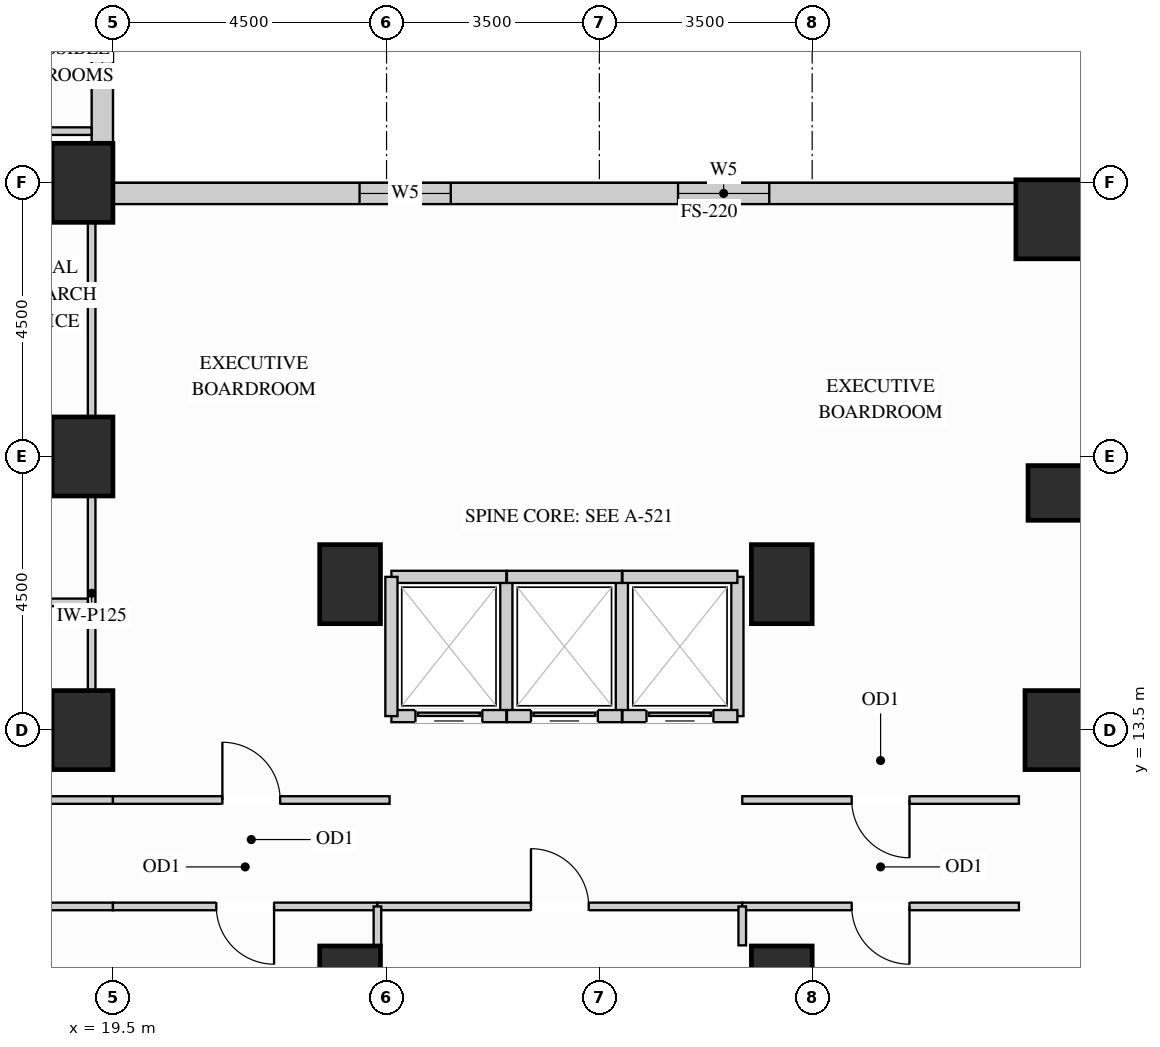
"""IFC4 building model, lengths in metres.
Left out: names, types, materials, properties, quantities, classifications, styles, units other than length and angle.
Written with IfcOpenShell. Run it as: python <this file> out.ifc"""

import sys

from ifc_helpers import new_model, si_unit, direction, frame, frame_2d, origin, origin_2d, place, context, subcontext, project, spatial, rectangle, extrude, source, transform, mapped, element, fill, save


model = new_model("IFC4")
c1 = context("Model", 3, precision=1e-05, world=origin(), true_north=direction((0.0, 1.0)))
c2 = subcontext(c1, "Body", "Model", "MODEL_VIEW")
j1 = project(units=[si_unit("LENGTHUNIT", "METRE"), si_unit("PLANEANGLEUNIT", "RADIAN")], contexts=[c1])
p1 = place(None, origin())
s1 = spatial("IfcSite", under=j1, at=p1, CompositionType="ELEMENT")
p2 = place(p1, origin())
s2 = spatial("IfcBuilding", under=s1, at=p2, CompositionType="ELEMENT")
p3 = place(p2, frame((0.0, 0.0, 69.3)))
s3 = spatial("IfcBuildingStorey", under=s2, at=p3, CompositionType="ELEMENT", Elevation=69.3)
m1 = source(origin(), c2, "Body", "SweptSolid", [
    extrude(rectangle(XDim=0.9, YDim=0.9, at=origin_2d()), origin(), (0.0, 0.0, 1.0), 3.32),
])
p4 = place(p3, frame((35.0, 17.4, 0.0), z_axis=(0.0, 0.0, 1.0), x_axis=(1.0, 0.0, 0.0)))
e1 = element("IfcColumn", 1, at=p4, inside=s3, PredefinedType="COLUMN", context=c2, shape_type="MappedRepresentation", body=[
    mapped(m1, transform((0.0, 0.0, 0.0), x_axis=(1.0, 0.0, 0.0), y_axis=(0.0, 1.0, 0.0), z_axis=(0.0, 0.0, 1.0))),
])
m2 = source(origin(), c2, "Body", "SweptSolid", [
    extrude(rectangle(XDim=1.0, YDim=1.3, at=origin_2d()), origin(), (0.0, 0.0, 1.0), 3.32),
])
for number, where, z_axis, x_axis in (
    (2, (19.0, 13.5, 0.0), (0.0, 0.0, 1.0), (1.0, 0.0, 0.0)),
    (3, (19.0, 18.0, 0.0), (0.0, 0.0, 1.0), (1.0, 0.0, 0.0)),
    (4, (19.0, 22.5, 0.0), (0.0, 0.0, 1.0), (1.0, 0.0, 0.0)),
    (5, (35.0, 13.5, 0.0), (0.0, 0.0, 1.0), (1.0, 0.0, 0.0)),
    (6, (23.4, 15.9, 0.0), (0.0, 0.0, 1.0), (1.0, 0.0, 0.0)),
    (7, (23.4, 9.3, 0.0), (0.0, 0.0, 1.0), (1.0, 0.0, 0.0)),
    (8, (30.5, 15.9, 0.0), (0.0, 0.0, 1.0), (1.0, 0.0, 0.0)),
    (9, (30.5, 9.3, 0.0), (0.0, 0.0, 1.0), (1.0, 0.0, 0.0)),
):
    element("IfcColumn", number, at=place(p3, frame(where, z_axis=z_axis, x_axis=x_axis)), inside=s3, PredefinedType="COLUMN", context=c2, shape_type="MappedRepresentation", body=[
        mapped(m2, transform((0.0, 0.0, 0.0), x_axis=(1.0, 0.0, 0.0), y_axis=(0.0, 1.0, 0.0), z_axis=(0.0, 0.0, 1.0))),
    ])
m3 = source(origin(), c2, "Body", "SweptSolid", [
    extrude(rectangle(XDim=1.3, YDim=1.3, at=origin_2d()), origin(), (0.0, 0.0, 1.0), 3.32),
])
p5 = place(p3, frame((35.0, 21.9, 0.0), z_axis=(0.0, 0.0, 1.0), x_axis=(1.0, 0.0, 0.0)))
e10 = element("IfcColumn", 10, at=p5, inside=s3, PredefinedType="COLUMN", context=c2, shape_type="MappedRepresentation", body=[
    mapped(m3, transform((0.0, 0.0, 0.0), x_axis=(1.0, 0.0, 0.0), y_axis=(0.0, 1.0, 0.0), z_axis=(0.0, 0.0, 1.0))),
])
p6 = place(p3, frame((34.352, 22.325, 0.0), z_axis=(0.0, 0.0, 1.0), x_axis=(-1.0, 0.0, 0.0)))
e11 = element("IfcWall", 11, at=p6, inside=s3, PredefinedType="SOLIDWALL", context=c2, shape_type="SweptSolid", body=[
    extrude(rectangle(XDim=14.854, YDim=0.35, at=frame_2d((7.427, 0.0))), origin(), (0.0, 0.0, 1.0), 3.305),
])
p7 = place(p6, frame((4.058, 0.0, 0.78)))
e12 = element("IfcOpeningElement", 12, at=p7, cuts=e11, PredefinedType="OPENING", context=c2, shape_type="SweptSolid", body=[
    extrude(rectangle(XDim=1.5, YDim=2.0, at=frame_2d((0.75, 1.0))), frame((0.0, 0.185, 0.0), z_axis=(0.0, -1.0, 0.0), x_axis=(1.0, 0.0, 0.0)), (0.0, 0.0, 1.0), 0.37),
])
p8 = place(p6, frame((9.296, 0.0, 0.78)))
e13 = element("IfcOpeningElement", 13, at=p8, cuts=e11, PredefinedType="OPENING", context=c2, shape_type="SweptSolid", body=[
    extrude(rectangle(XDim=1.5, YDim=2.0, at=frame_2d((0.75, 1.0))), frame((0.0, 0.185, 0.0), z_axis=(0.0, -1.0, 0.0), x_axis=(1.0, 0.0, 0.0)), (0.0, 0.0, 1.0), 0.37),
])
p9 = place(p3, frame((19.325, 23.148, 0.0), z_axis=(0.0, 0.0, 1.0), x_axis=(0.0, 1.0, 0.0)))
e14 = element("IfcWall", 14, at=p9, inside=s3, PredefinedType="SOLIDWALL", context=c2, shape_type="SweptSolid", body=[
    extrude(rectangle(XDim=3.004, YDim=0.35, at=frame_2d((1.502, 0.0))), origin(), (0.0, 0.0, 1.0), 2.45),
])
p10 = place(p9, frame((1.031, 0.0, 0.78)))
e15 = element("IfcOpeningElement", 15, at=p10, cuts=e14, PredefinedType="OPENING", context=c2, shape_type="SweptSolid", body=[
    extrude(rectangle(XDim=1.5, YDim=1.49, at=frame_2d((0.75, 0.745))), frame((0.0, 0.185, 0.0), z_axis=(0.0, -1.0, 0.0), x_axis=(1.0, 0.0, 0.0)), (0.0, 0.0, 1.0), 0.37),
])
m4 = source(origin(), c2, "Body", "SweptSolid", [
    extrude(rectangle(XDim=2.6, YDim=0.125, at=frame_2d((1.3, 0.0))), origin(), (0.0, 0.0, 1.0), 3.305),
])
p11 = place(p3, frame((16.55, 15.6, 0.0), z_axis=(0.0, 0.0, 1.0), x_axis=(1.0, 0.0, 0.0)))
e16 = element("IfcWall", 16, at=p11, inside=s3, PredefinedType="PARTITIONING", context=c2, shape_type="MappedRepresentation", body=[
    mapped(m4, transform((0.0, 0.0, 0.0), x_axis=(1.0, 0.0, 0.0), y_axis=(0.0, 1.0, 0.0), z_axis=(0.0, 0.0, 1.0))),
])
m5 = source(origin(), c2, "Body", "SweptSolid", [
    extrude(rectangle(XDim=2.598, YDim=0.125, at=frame_2d((1.299, 0.0))), origin(), (0.0, 0.0, 1.0), 3.305),
])
p12 = place(p3, frame((16.55, 23.35, 0.0), z_axis=(0.0, 0.0, 1.0), x_axis=(1.0, 0.0, 0.0)))
e17 = element("IfcWall", 17, at=p12, inside=s3, PredefinedType="PARTITIONING", context=c2, shape_type="MappedRepresentation", body=[
    mapped(m5, transform((0.0, 0.0, 0.0), x_axis=(1.0, 0.0, 0.0), y_axis=(0.0, 1.0, 0.0), z_axis=(0.0, 0.0, 1.0))),
])
m6 = source(origin(), c2, "Body", "SweptSolid", [
    extrude(rectangle(XDim=3.18, YDim=0.125, at=frame_2d((1.59, 0.0))), origin(), (0.0, 0.0, 1.0), 2.61),
])
for number, where, z_axis, x_axis in (
    (18, (19.15, 14.16, 0.0), (0.0, 0.0, 1.0), (0.0, 1.0, 0.0)),
    (19, (19.15, 18.66, 0.0), (0.0, 0.0, 1.0), (0.0, 1.0, 0.0)),
):
    element("IfcWall", number, at=place(p3, frame(where, z_axis=z_axis, x_axis=x_axis)), inside=s3, PredefinedType="PARTITIONING", context=c2, shape_type="MappedRepresentation", body=[
        mapped(m6, transform((0.0, 0.0, 0.0), x_axis=(1.0, 0.0, 0.0), y_axis=(0.0, 1.0, 0.0), z_axis=(0.0, 0.0, 1.0))),
    ])
p13 = place(p3, frame((29.85, 12.35, 0.0), z_axis=(0.0, 0.0, 1.0), x_axis=(1.0, 0.0, 0.0)))
e20 = element("IfcWall", 20, at=p13, inside=s3, PredefinedType="PARTITIONING", context=c2, shape_type="SweptSolid", body=[
    extrude(rectangle(XDim=4.55, YDim=0.125, at=frame_2d((2.275, 0.0))), origin(), (0.0, 0.0, 1.0), 3.305),
])
p14 = place(p13, frame((1.8, 0.0, 0.0)))
e21 = element("IfcOpeningElement", 21, at=p14, cuts=e20, PredefinedType="OPENING", context=c2, shape_type="SweptSolid", body=[
    extrude(rectangle(XDim=0.95, YDim=2.15, at=frame_2d((0.475, 1.075))), frame((0.0, 0.073, 0.0), z_axis=(0.0, -1.0, 0.0), x_axis=(1.0, 0.0, 0.0)), (0.0, 0.0, 1.0), 0.145),
])
m7 = source(origin(), c2, "Body", "SweptSolid", [
    extrude(rectangle(XDim=2.95, YDim=0.125, at=frame_2d((1.475, 0.0))), origin(), (0.0, 0.0, 1.0), 3.305),
])
p15 = place(p3, frame((16.55, 12.35, 0.0), z_axis=(0.0, 0.0, 1.0), x_axis=(1.0, 0.0, 0.0)))
e22 = element("IfcWall", 22, at=p15, inside=s3, PredefinedType="PARTITIONING", context=c2, shape_type="MappedRepresentation", body=[
    mapped(m7, transform((0.0, 0.0, 0.0), x_axis=(1.0, 0.0, 0.0), y_axis=(0.0, 1.0, 0.0), z_axis=(0.0, 0.0, 1.0))),
])
p16 = place(p3, frame((19.5, 12.35, 0.0), z_axis=(0.0, 0.0, 1.0), x_axis=(1.0, 0.0, 0.0)))
e23 = element("IfcWall", 23, at=p16, inside=s3, PredefinedType="PARTITIONING", context=c2, shape_type="SweptSolid", body=[
    extrude(rectangle(XDim=4.55, YDim=0.125, at=frame_2d((2.275, 0.0))), origin(), (0.0, 0.0, 1.0), 3.305),
])
p17 = place(p16, frame((1.8, 0.0, 0.0)))
e24 = element("IfcOpeningElement", 24, at=p17, cuts=e23, PredefinedType="OPENING", context=c2, shape_type="SweptSolid", body=[
    extrude(rectangle(XDim=0.95, YDim=2.15, at=frame_2d((0.475, 1.075))), frame((0.0, 0.073, 0.0), z_axis=(0.0, -1.0, 0.0), x_axis=(1.0, 0.0, 0.0)), (0.0, 0.0, 1.0), 0.145),
])
p18 = place(p3, frame((16.55, 10.6, 0.0), z_axis=(0.0, 0.0, 1.0), x_axis=(1.0, 0.0, 0.0)))
e25 = element("IfcWall", 25, at=p18, inside=s3, PredefinedType="PARTITIONING", context=c2, shape_type="MappedRepresentation", body=[
    mapped(m7, transform((0.0, 0.0, 0.0), x_axis=(1.0, 0.0, 0.0), y_axis=(0.0, 1.0, 0.0), z_axis=(0.0, 0.0, 1.0))),
])
p19 = place(p3, frame((19.5, 10.6, 0.0), z_axis=(0.0, 0.0, 1.0), x_axis=(1.0, 0.0, 0.0)))
e26 = element("IfcWall", 26, at=p19, inside=s3, PredefinedType="PARTITIONING", context=c2, shape_type="SweptSolid", body=[
    extrude(rectangle(XDim=4.35, YDim=0.125, at=frame_2d((2.175, 0.0))), origin(), (0.0, 0.0, 1.0), 3.305),
])
p20 = place(p19, frame((1.7, 0.0, 0.0)))
e27 = element("IfcOpeningElement", 27, at=p20, cuts=e26, PredefinedType="OPENING", context=c2, shape_type="SweptSolid", body=[
    extrude(rectangle(XDim=0.95, YDim=2.15, at=frame_2d((0.475, 1.075))), frame((0.0, 0.073, 0.0), z_axis=(0.0, -1.0, 0.0), x_axis=(1.0, 0.0, 0.0)), (0.0, 0.0, 1.0), 0.145),
])
p21 = place(p3, frame((23.85, 10.6, 0.0), z_axis=(0.0, 0.0, 1.0), x_axis=(1.0, 0.0, 0.0)))
e28 = element("IfcWall", 28, at=p21, inside=s3, PredefinedType="PARTITIONING", context=c2, shape_type="SweptSolid", body=[
    extrude(rectangle(XDim=6.0, YDim=0.125, at=frame_2d((3.0, 0.0))), origin(), (0.0, 0.0, 1.0), 3.305),
])
p22 = place(p21, frame((2.525, 0.0, 0.0)))
e29 = element("IfcOpeningElement", 29, at=p22, cuts=e28, PredefinedType="OPENING", context=c2, shape_type="SweptSolid", body=[
    extrude(rectangle(XDim=0.95, YDim=2.15, at=frame_2d((0.475, 1.075))), frame((0.0, 0.073, 0.0), z_axis=(0.0, -1.0, 0.0), x_axis=(1.0, 0.0, 0.0)), (0.0, 0.0, 1.0), 0.145),
])
p23 = place(p3, frame((29.85, 10.6, 0.0), z_axis=(0.0, 0.0, 1.0), x_axis=(1.0, 0.0, 0.0)))
e30 = element("IfcWall", 30, at=p23, inside=s3, PredefinedType="PARTITIONING", context=c2, shape_type="SweptSolid", body=[
    extrude(rectangle(XDim=4.55, YDim=0.125, at=frame_2d((2.275, 0.0))), origin(), (0.0, 0.0, 1.0), 3.305),
])
p24 = place(p23, frame((1.8, 0.0, 0.0)))
e31 = element("IfcOpeningElement", 31, at=p24, cuts=e30, PredefinedType="OPENING", context=c2, shape_type="SweptSolid", body=[
    extrude(rectangle(XDim=0.95, YDim=2.15, at=frame_2d((0.475, 1.075))), frame((0.0, 0.073, 0.0), z_axis=(0.0, -1.0, 0.0), x_axis=(1.0, 0.0, 0.0)), (0.0, 0.0, 1.0), 0.145),
])
m8 = source(origin(), c2, "Body", "SweptSolid", [
    extrude(rectangle(XDim=0.64, YDim=0.125, at=frame_2d((0.32, 0.0))), origin(), (0.0, 0.0, 1.0), 3.305),
])
for number, where, z_axis, x_axis in (
    (32, (23.85, 9.96, 0.0), (0.0, 0.0, 1.0), (0.0, 1.0, 0.0)),
    (33, (29.85, 9.96, 0.0), (0.0, 0.0, 1.0), (0.0, 1.0, 0.0)),
):
    element("IfcWall", number, at=place(p3, frame(where, z_axis=z_axis, x_axis=x_axis)), inside=s3, PredefinedType="PARTITIONING", context=c2, shape_type="MappedRepresentation", body=[
        mapped(m8, transform((0.0, 0.0, 0.0), x_axis=(1.0, 0.0, 0.0), y_axis=(0.0, 1.0, 0.0), z_axis=(0.0, 0.0, 1.0))),
    ])
m9 = source(origin(), c2, "Body", "SweptSolid", [
    extrude(rectangle(XDim=2.29, YDim=0.2, at=frame_2d((1.145, 0.0))), origin(), (0.0, 0.0, 1.0), 3.305),
])
p25 = place(p3, frame((25.97, 13.73, 0.0), z_axis=(0.0, 0.0, 1.0), x_axis=(0.0, 1.0, 0.0)))
e34 = element("IfcWall", 34, at=p25, inside=s3, PredefinedType="PARTITIONING", context=c2, shape_type="MappedRepresentation", body=[
    mapped(m9, transform((0.0, 0.0, 0.0), x_axis=(1.0, 0.0, 0.0), y_axis=(0.0, 1.0, 0.0), z_axis=(0.0, 0.0, 1.0))),
])
m10 = source(origin(), c2, "Body", "SweptSolid", [
    extrude(rectangle(XDim=1.89, YDim=0.2, at=frame_2d((0.945, 0.0))), origin(), (0.0, 0.0, 1.0), 2.61),
])
p26 = place(p3, frame((24.08, 16.02, 0.0), z_axis=(0.0, 0.0, 1.0), x_axis=(1.0, 0.0, 0.0)))
e35 = element("IfcWall", 35, at=p26, inside=s3, PredefinedType="PARTITIONING", context=c2, shape_type="MappedRepresentation", body=[
    mapped(m10, transform((0.0, 0.0, 0.0), x_axis=(1.0, 0.0, 0.0), y_axis=(0.0, 1.0, 0.0), z_axis=(0.0, 0.0, 1.0))),
])
p27 = place(p3, frame((24.08, 13.73, 0.0), z_axis=(0.0, 0.0, 1.0), x_axis=(1.0, 0.0, 0.0)))
e36 = element("IfcWall", 36, at=p27, inside=s3, PredefinedType="PARTITIONING", context=c2, shape_type="SweptSolid", body=[
    extrude(rectangle(XDim=1.89, YDim=0.2, at=frame_2d((0.945, 0.0))), origin(), (0.0, 0.0, 1.0), 2.386),
])
p28 = place(p27, frame((0.395, 0.0, 0.0)))
e37 = element("IfcOpeningElement", 37, at=p28, cuts=e36, PredefinedType="OPENING", context=c2, shape_type="SweptSolid", body=[
    extrude(rectangle(XDim=1.1, YDim=2.2, at=frame_2d((0.55, 1.1))), frame((0.0, 0.11, 0.0), z_axis=(0.0, -1.0, 0.0), x_axis=(1.0, 0.0, 0.0)), (0.0, 0.0, 1.0), 0.22),
])
for number, where, z_axis, x_axis in (
    (38, (24.08, 13.73, 0.0), (0.0, 0.0, 1.0), (0.0, 1.0, 0.0)),
    (39, (27.87, 13.73, 0.0), (0.0, 0.0, 1.0), (0.0, 1.0, 0.0)),
):
    element("IfcWall", number, at=place(p3, frame(where, z_axis=z_axis, x_axis=x_axis)), inside=s3, PredefinedType="PARTITIONING", context=c2, shape_type="MappedRepresentation", body=[
        mapped(m9, transform((0.0, 0.0, 0.0), x_axis=(1.0, 0.0, 0.0), y_axis=(0.0, 1.0, 0.0), z_axis=(0.0, 0.0, 1.0))),
    ])
m11 = source(origin(), c2, "Body", "SweptSolid", [
    extrude(rectangle(XDim=1.89, YDim=0.2, at=frame_2d((0.945, 0.0))), origin(), (0.0, 0.0, 1.0), 2.61),
])
p29 = place(p3, frame((25.98, 16.02, 0.0), z_axis=(0.0, 0.0, 1.0), x_axis=(1.0, 0.0, 0.0)))
e40 = element("IfcWall", 40, at=p29, inside=s3, PredefinedType="PARTITIONING", context=c2, shape_type="MappedRepresentation", body=[
    mapped(m11, transform((0.0, 0.0, 0.0), x_axis=(1.0, 0.0, 0.0), y_axis=(0.0, 1.0, 0.0), z_axis=(0.0, 0.0, 1.0))),
])
p30 = place(p3, frame((25.98, 13.73, 0.0), z_axis=(0.0, 0.0, 1.0), x_axis=(1.0, 0.0, 0.0)))
e41 = element("IfcWall", 41, at=p30, inside=s3, PredefinedType="PARTITIONING", context=c2, shape_type="SweptSolid", body=[
    extrude(rectangle(XDim=1.89, YDim=0.2, at=frame_2d((0.945, 0.0))), origin(), (0.0, 0.0, 1.0), 2.386),
])
p31 = place(p30, frame((0.395, 0.0, 0.0)))
e42 = element("IfcOpeningElement", 42, at=p31, cuts=e41, PredefinedType="OPENING", context=c2, shape_type="SweptSolid", body=[
    extrude(rectangle(XDim=1.1, YDim=2.2, at=frame_2d((0.55, 1.1))), frame((0.0, 0.11, 0.0), z_axis=(0.0, -1.0, 0.0), x_axis=(1.0, 0.0, 0.0)), (0.0, 0.0, 1.0), 0.22),
])
p32 = place(p3, frame((29.77, 13.73, 0.0), z_axis=(0.0, 0.0, 1.0), x_axis=(0.0, 1.0, 0.0)))
e43 = element("IfcWall", 43, at=p32, inside=s3, PredefinedType="PARTITIONING", context=c2, shape_type="MappedRepresentation", body=[
    mapped(m9, transform((0.0, 0.0, 0.0), x_axis=(1.0, 0.0, 0.0), y_axis=(0.0, 1.0, 0.0), z_axis=(0.0, 0.0, 1.0))),
])
p33 = place(p3, frame((27.88, 16.02, 0.0), z_axis=(0.0, 0.0, 1.0), x_axis=(1.0, 0.0, 0.0)))
e44 = element("IfcWall", 44, at=p33, inside=s3, PredefinedType="PARTITIONING", context=c2, shape_type="MappedRepresentation", body=[
    mapped(m11, transform((0.0, 0.0, 0.0), x_axis=(1.0, 0.0, 0.0), y_axis=(0.0, 1.0, 0.0), z_axis=(0.0, 0.0, 1.0))),
])
p34 = place(p3, frame((27.88, 13.73, 0.0), z_axis=(0.0, 0.0, 1.0), x_axis=(1.0, 0.0, 0.0)))
e45 = element("IfcWall", 45, at=p34, inside=s3, PredefinedType="PARTITIONING", context=c2, shape_type="SweptSolid", body=[
    extrude(rectangle(XDim=1.89, YDim=0.2, at=frame_2d((0.945, 0.0))), origin(), (0.0, 0.0, 1.0), 2.386),
])
p35 = place(p34, frame((0.395, 0.0, 0.0)))
e46 = element("IfcOpeningElement", 46, at=p35, cuts=e45, PredefinedType="OPENING", context=c2, shape_type="SweptSolid", body=[
    extrude(rectangle(XDim=1.1, YDim=2.2, at=frame_2d((0.55, 1.1))), frame((0.0, 0.11, 0.0), z_axis=(0.0, -1.0, 0.0), x_axis=(1.0, 0.0, 0.0)), (0.0, 0.0, 1.0), 0.22),
])
m12 = source(origin(), c2, "Body", "SweptSolid", [
    extrude(rectangle(XDim=1.1, YDim=2.2, at=frame_2d((0.55, 1.1))), frame((0.0, 0.025, 0.0), z_axis=(0.0, -1.0, 0.0), x_axis=(1.0, 0.0, 0.0)), (0.0, 0.0, 1.0), 0.05),
])
p36 = place(p28, origin())
e47 = element("IfcDoor", 47, at=p36, inside=s3, OperationType="SLIDING_TO_LEFT", PredefinedType="DOOR", context=c2, shape_type="MappedRepresentation", body=[
    mapped(m12, transform((0.0, 0.0, 0.0), x_axis=(1.0, 0.0, 0.0), y_axis=(0.0, 1.0, 0.0), z_axis=(0.0, 0.0, 1.0))),
])
fill(e37, e47)
p37 = place(p31, origin())
e48 = element("IfcDoor", 48, at=p37, inside=s3, OperationType="SLIDING_TO_LEFT", PredefinedType="DOOR", context=c2, shape_type="MappedRepresentation", body=[
    mapped(m12, transform((0.0, 0.0, 0.0), x_axis=(1.0, 0.0, 0.0), y_axis=(0.0, 1.0, 0.0), z_axis=(0.0, 0.0, 1.0))),
])
fill(e42, e48)
p38 = place(p35, origin())
e49 = element("IfcDoor", 49, at=p38, inside=s3, OperationType="SLIDING_TO_LEFT", PredefinedType="DOOR", context=c2, shape_type="MappedRepresentation", body=[
    mapped(m12, transform((0.0, 0.0, 0.0), x_axis=(1.0, 0.0, 0.0), y_axis=(0.0, 1.0, 0.0), z_axis=(0.0, 0.0, 1.0))),
])
fill(e46, e49)
m13 = source(origin(), c2, "Body", "SweptSolid", [
    extrude(rectangle(XDim=0.95, YDim=2.15, at=frame_2d((0.475, 1.075))), frame((0.0, 0.025, 0.0), z_axis=(0.0, -1.0, 0.0), x_axis=(1.0, 0.0, 0.0)), (0.0, 0.0, 1.0), 0.05),
])
p39 = place(p17, origin())
e50 = element("IfcDoor", 50, at=p39, inside=s3, OperationType="SINGLE_SWING_LEFT", PredefinedType="DOOR", context=c2, shape_type="MappedRepresentation", body=[
    mapped(m13, transform((0.0, 0.0, 0.0), x_axis=(1.0, 0.0, 0.0), y_axis=(0.0, 1.0, 0.0), z_axis=(0.0, 0.0, 1.0))),
])
fill(e24, e50)
p40 = place(p14, origin())
e51 = element("IfcDoor", 51, at=p40, inside=s3, OperationType="SINGLE_SWING_RIGHT", PredefinedType="DOOR", context=c2, shape_type="MappedRepresentation", body=[
    mapped(m13, transform((0.0, 0.0, 0.0), x_axis=(1.0, 0.0, 0.0), y_axis=(0.0, 1.0, 0.0), z_axis=(0.0, 0.0, 1.0))),
])
fill(e21, e51)
p41 = place(p20, origin())
e52 = element("IfcDoor", 52, at=p41, inside=s3, OperationType="SINGLE_SWING_RIGHT", PredefinedType="DOOR", context=c2, shape_type="MappedRepresentation", body=[
    mapped(m13, transform((0.0, 0.0, 0.0), x_axis=(1.0, 0.0, 0.0), y_axis=(0.0, 1.0, 0.0), z_axis=(0.0, 0.0, 1.0))),
])
fill(e27, e52)
p42 = place(p22, origin())
e53 = element("IfcDoor", 53, at=p42, inside=s3, OperationType="SINGLE_SWING_LEFT", PredefinedType="DOOR", context=c2, shape_type="MappedRepresentation", body=[
    mapped(m13, transform((0.0, 0.0, 0.0), x_axis=(1.0, 0.0, 0.0), y_axis=(0.0, 1.0, 0.0), z_axis=(0.0, 0.0, 1.0))),
])
fill(e29, e53)
p43 = place(p24, origin())
e54 = element("IfcDoor", 54, at=p43, inside=s3, OperationType="SINGLE_SWING_RIGHT", PredefinedType="DOOR", context=c2, shape_type="MappedRepresentation", body=[
    mapped(m13, transform((0.0, 0.0, 0.0), x_axis=(1.0, 0.0, 0.0), y_axis=(0.0, 1.0, 0.0), z_axis=(0.0, 0.0, 1.0))),
])
fill(e31, e54)
m14 = source(origin(), c2, "Body", "SweptSolid", [
    extrude(rectangle(XDim=1.5, YDim=2.0, at=frame_2d((0.75, 1.0))), frame((0.0, 0.03, 0.0), z_axis=(0.0, -1.0, 0.0), x_axis=(1.0, 0.0, 0.0)), (0.0, 0.0, 1.0), 0.06),
])
p44 = place(p7, origin())
e55 = element("IfcWindow", 55, at=p44, inside=s3, PartitioningType="SINGLE_PANEL", PredefinedType="WINDOW", context=c2, shape_type="MappedRepresentation", body=[
    mapped(m14, transform((0.0, 0.0, 0.0), x_axis=(1.0, 0.0, 0.0), y_axis=(0.0, 1.0, 0.0), z_axis=(0.0, 0.0, 1.0))),
])
fill(e12, e55)
p45 = place(p8, origin())
e56 = element("IfcWindow", 56, at=p45, inside=s3, PartitioningType="SINGLE_PANEL", PredefinedType="WINDOW", context=c2, shape_type="MappedRepresentation", body=[
    mapped(m14, transform((0.0, 0.0, 0.0), x_axis=(1.0, 0.0, 0.0), y_axis=(0.0, 1.0, 0.0), z_axis=(0.0, 0.0, 1.0))),
])
fill(e13, e56)
m15 = source(origin(), c2, "Body", "SweptSolid", [
    extrude(rectangle(XDim=1.5, YDim=1.49, at=frame_2d((0.75, 0.745))), frame((0.0, 0.03, 0.0), z_axis=(0.0, -1.0, 0.0), x_axis=(1.0, 0.0, 0.0)), (0.0, 0.0, 1.0), 0.06),
])
p46 = place(p10, origin())
e57 = element("IfcWindow", 57, at=p46, inside=s3, PartitioningType="SINGLE_PANEL", PredefinedType="WINDOW", context=c2, shape_type="MappedRepresentation", body=[
    mapped(m15, transform((0.0, 0.0, 0.0), x_axis=(1.0, 0.0, 0.0), y_axis=(0.0, 1.0, 0.0), z_axis=(0.0, 0.0, 1.0))),
])
fill(e15, e57)
save(model, sys.argv[1])
